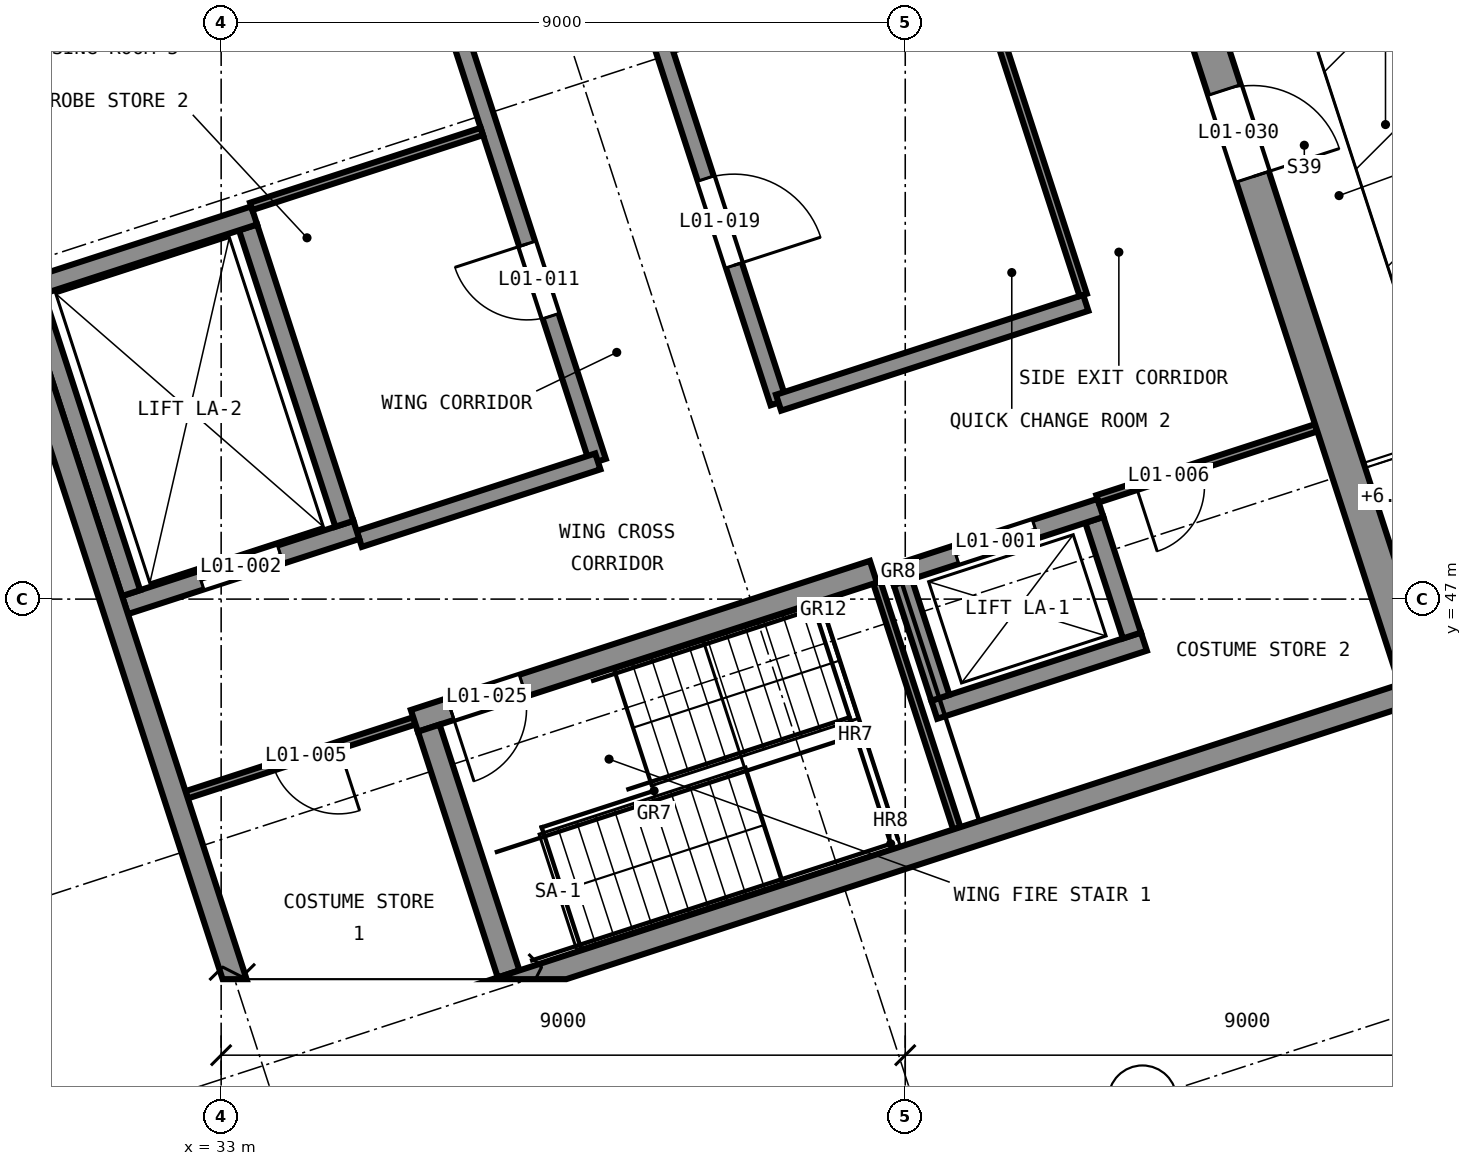
"""IFC4 building model, lengths in metres.
Left out: names, types, materials, properties, quantities, classifications, styles, units other than length and angle.
Written with IfcOpenShell. Run it as: python <this file> out.ifc"""

import sys

from ifc_helpers import new_model, si_unit, direction, frame, frame_2d, origin, place, context, subcontext, project, spatial, rectangle, extrude, element, fill, save


model = new_model("IFC4")
c1 = context("Model", 3, precision=1e-05, world=origin(), true_north=direction((0.0, 1.0)))
c2 = subcontext(c1, "Body", "Model", "MODEL_VIEW")
j1 = project(units=[si_unit("LENGTHUNIT", "METRE"), si_unit("PLANEANGLEUNIT", "RADIAN")], contexts=[c1])
p1 = place(None, origin())
s1 = spatial("IfcSite", under=j1, at=p1, CompositionType="ELEMENT")
p2 = place(p1, origin())
s2 = spatial("IfcBuilding", under=s1, at=p2, CompositionType="ELEMENT")
p3 = place(p2, frame((0.0, 0.0, 5.5)))
s3 = spatial("IfcBuildingStorey", under=s2, at=p3, CompositionType="ELEMENT", Elevation=5.5)
p4 = place(p3, frame((49.93, 42.214, 0.0), z_axis=(0.0, 0.0, 1.0), x_axis=(-0.309016215614, 0.95105676933, 0.0)))
e1 = element("IfcWall", 1, at=p4, inside=s3, PredefinedType="SHEAR", context=c2, shape_type="SweptSolid", body=[
    extrude(rectangle(XDim=27.975, YDim=0.45, at=frame_2d((13.988, 0.0))), origin(), (0.0, 0.0, 1.0), 4.0),
])
p5 = place(p4, frame((10.875, 0.0, 0.0)))
e2 = element("IfcOpeningElement", 2, at=p5, cuts=e1, PredefinedType="OPENING", context=c2, shape_type="SweptSolid", body=[
    extrude(rectangle(XDim=1.2, YDim=2.1, at=frame_2d((0.6, 1.05))), frame((0.0, 0.235, 0.0), z_axis=(0.0, -1.0, 0.0), x_axis=(1.0, 0.0, 0.0)), (0.0, 0.0, 1.0), 0.47),
])
p6 = place(p3, frame((48.55, 45.735, 0.0), z_axis=(0.0, 0.0, 1.0), x_axis=(-0.951061216338, -0.309002528757, 0.0)))
e3 = element("IfcWall", 3, at=p6, inside=s3, PredefinedType="SOLIDWALL", context=c2, shape_type="SweptSolid", body=[
    extrude(rectangle(XDim=15.925, YDim=0.3, at=frame_2d((7.962, 0.0))), origin(), (0.0, 0.0, 1.0), 4.0),
])
p7 = place(p3, frame((33.501, 41.003, 0.0), z_axis=(0.0, 0.0, 1.0), x_axis=(-0.309017194826, 0.951056451165, 0.0)))
e4 = element("IfcWall", 4, at=p7, inside=s3, PredefinedType="SOLIDWALL", context=c2, shape_type="SweptSolid", body=[
    extrude(rectangle(XDim=53.7, YDim=0.3, at=frame_2d((26.85, 0.0))), origin(), (0.0, 0.0, 1.0), 4.0),
])
p8 = place(p7, frame((26.55, 0.0, 0.9)))
e5 = element("IfcOpeningElement", 5, at=p8, cuts=e4, PredefinedType="OPENING", context=c2, shape_type="SweptSolid", body=[
    extrude(rectangle(XDim=3.6, YDim=2.1, at=frame_2d((1.8, 1.05))), frame((0.0, 0.16, 0.0), z_axis=(0.0, -1.0, 0.0), x_axis=(1.0, 0.0, 0.0)), (0.0, 0.0, 1.0), 0.32),
])
p9 = place(p3, frame((41.581, 47.361, 0.0), z_axis=(0.0, 0.0, 1.0), x_axis=(-0.951058929949, -0.309009565815, 0.0)))
e6 = element("IfcWall", 6, at=p9, inside=s3, PredefinedType="SOLIDWALL", context=c2, shape_type="SweptSolid", body=[
    extrude(rectangle(XDim=6.35, YDim=0.3, at=frame_2d((3.175, 0.0))), origin(), (0.0, 0.0, 1.0), 3.7),
])
p10 = place(p9, frame((4.85, 0.0, 0.0)))
e7 = element("IfcOpeningElement", 7, at=p10, cuts=e6, PredefinedType="OPENING", context=c2, shape_type="SweptSolid", body=[
    extrude(rectangle(XDim=1.0, YDim=2.1, at=frame_2d((0.5, 1.05))), frame((0.0, 0.16, 0.0), z_axis=(0.0, -1.0, 0.0), x_axis=(1.0, 0.0, 0.0)), (0.0, 0.0, 1.0), 0.32),
])
p11 = place(p3, frame((35.731, 45.302, 0.0), z_axis=(0.0, 0.0, 1.0), x_axis=(0.308980533303, -0.951068362443, 0.0)))
e8 = element("IfcWall", 8, at=p11, inside=s3, PredefinedType="SOLIDWALL", context=c2, shape_type="SweptSolid", body=[
    extrude(rectangle(XDim=3.4, YDim=0.3, at=frame_2d((1.7, 0.0))), origin(), (0.0, 0.0, 1.0), 3.7),
])
p12 = place(p3, frame((42.382, 45.544, 0.0), z_axis=(0.0, 0.0, 1.0), x_axis=(0.951071801089, 0.308969948659, 0.0)))
e9 = element("IfcWall", 9, at=p12, inside=s3, PredefinedType="SHEAR", context=c2, shape_type="SweptSolid", body=[
    extrude(rectangle(XDim=2.9, YDim=0.25, at=frame_2d((1.45, 0.0))), origin(), (0.0, 0.0, 1.0), 4.0),
])
p13 = place(p3, frame((44.982, 46.521, 0.0), z_axis=(0.0, 0.0, 1.0), x_axis=(-0.308986014439, 0.951066581729, 0.0)))
e10 = element("IfcWall", 10, at=p13, inside=s3, PredefinedType="SHEAR", context=c2, shape_type="SweptSolid", body=[
    extrude(rectangle(XDim=1.6, YDim=0.25, at=frame_2d((0.8, 0.0))), origin(), (0.0, 0.0, 1.0), 4.0),
])
p14 = place(p3, frame((44.568, 48.2, 0.0), z_axis=(0.0, 0.0, 1.0), x_axis=(-0.951047059821, -0.309046096893, 0.0)))
e11 = element("IfcWall", 11, at=p14, inside=s3, PredefinedType="SHEAR", context=c2, shape_type="SweptSolid", body=[
    extrude(rectangle(XDim=2.9, YDim=0.25, at=frame_2d((1.45, 0.0))), origin(), (0.0, 0.0, 1.0), 4.0),
])
p15 = place(p14, frame((0.9, 0.0, 0.0)))
e12 = element("IfcOpeningElement", 12, at=p15, cuts=e11, PredefinedType="OPENING", context=c2, shape_type="SweptSolid", body=[
    extrude(rectangle(XDim=1.1, YDim=2.1, at=frame_2d((0.55, 1.05))), frame((0.0, 0.135, 0.0), z_axis=(0.0, -1.0, 0.0), x_axis=(1.0, 0.0, 0.0)), (0.0, 0.0, 1.0), 0.27),
])
p16 = place(p3, frame((41.968, 47.224, 0.0), z_axis=(0.0, 0.0, 1.0), x_axis=(0.308986014439, -0.951066581729, 0.0)))
e13 = element("IfcWall", 13, at=p16, inside=s3, PredefinedType="SHEAR", context=c2, shape_type="SweptSolid", body=[
    extrude(rectangle(XDim=1.6, YDim=0.25, at=frame_2d((0.8, 0.0))), origin(), (0.0, 0.0, 1.0), 4.0),
])
p17 = place(p3, frame((31.735, 46.922, 0.0), z_axis=(0.0, 0.0, 1.0), x_axis=(0.95104415986, 0.309055020985, 0.0)))
e14 = element("IfcWall", 14, at=p17, inside=s3, PredefinedType="SHEAR", context=c2, shape_type="SweptSolid", body=[
    extrude(rectangle(XDim=3.2, YDim=0.25, at=frame_2d((1.6, 0.0))), origin(), (0.0, 0.0, 1.0), 4.0),
])
p18 = place(p17, frame((1.05, 0.0, 0.0)))
e15 = element("IfcOpeningElement", 15, at=p18, cuts=e14, PredefinedType="OPENING", context=c2, shape_type="SweptSolid", body=[
    extrude(rectangle(XDim=1.1, YDim=2.1, at=frame_2d((0.55, 1.05))), frame((0.0, 0.135, 0.0), z_axis=(0.0, -1.0, 0.0), x_axis=(1.0, 0.0, 0.0)), (0.0, 0.0, 1.0), 0.27),
])
p19 = place(p3, frame((34.621, 47.991, 0.0), z_axis=(0.0, 0.0, 1.0), x_axis=(-0.309055103076, 0.951044133184, 0.0)))
e16 = element("IfcWall", 16, at=p19, inside=s3, PredefinedType="SHEAR", context=c2, shape_type="SweptSolid", body=[
    extrude(rectangle(XDim=4.1, YDim=0.25, at=frame_2d((2.05, 0.0))), origin(), (0.0, 0.0, 1.0), 4.0),
])
p20 = place(p3, frame((33.434, 52.048, 0.0), z_axis=(0.0, 0.0, 1.0), x_axis=(-0.951066581729, -0.308986014439, 0.0)))
e17 = element("IfcWall", 17, at=p20, inside=s3, PredefinedType="SHEAR", context=c2, shape_type="SweptSolid", body=[
    extrude(rectangle(XDim=3.2, YDim=0.25, at=frame_2d((1.6, 0.0))), origin(), (0.0, 0.0, 1.0), 4.0),
])
p21 = place(p3, frame((30.548, 50.979, 0.0), z_axis=(0.0, 0.0, 1.0), x_axis=(0.309055103076, -0.951044133184, 0.0)))
e18 = element("IfcWall", 18, at=p21, inside=s3, PredefinedType="SHEAR", context=c2, shape_type="SweptSolid", body=[
    extrude(rectangle(XDim=4.1, YDim=0.25, at=frame_2d((2.05, 0.0))), origin(), (0.0, 0.0, 1.0), 4.0),
])
p22 = place(p3, frame((37.956, 48.812, 0.0), z_axis=(0.0, 0.0, 1.0), x_axis=(-0.30901736393, 0.951056396219, 0.0)))
e19 = element("IfcWall", 19, at=p22, inside=s3, PredefinedType="SOLIDWALL", context=c2, shape_type="SweptSolid", body=[
    extrude(rectangle(XDim=41.7, YDim=0.22, at=frame_2d((20.85, 0.0))), origin(), (0.0, 0.0, 1.0), 3.7),
])
p23 = place(p22, frame((2.009, 0.0, 0.0)))
e20 = element("IfcOpeningElement", 20, at=p23, cuts=e19, PredefinedType="OPENING", context=c2, shape_type="SweptSolid", body=[
    extrude(rectangle(XDim=1.0, YDim=2.1, at=frame_2d((0.5, 1.05))), frame((0.0, 0.12, 0.0), z_axis=(0.0, -1.0, 0.0), x_axis=(1.0, 0.0, 0.0)), (0.0, 0.0, 1.0), 0.24),
])
p24 = place(p22, frame((6.6, 0.0, 0.0)))
e21 = element("IfcOpeningElement", 21, at=p24, cuts=e19, PredefinedType="OPENING", context=c2, shape_type="SweptSolid", body=[
    extrude(rectangle(XDim=1.2, YDim=2.1, at=frame_2d((0.6, 1.05))), frame((0.0, 0.12, 0.0), z_axis=(0.0, -1.0, 0.0), x_axis=(1.0, 0.0, 0.0)), (0.0, 0.0, 1.0), 0.24),
])
p25 = place(p22, frame((11.7, 0.0, 0.0)))
e22 = element("IfcOpeningElement", 22, at=p25, cuts=e19, PredefinedType="OPENING", context=c2, shape_type="SweptSolid", body=[
    extrude(rectangle(XDim=1.2, YDim=2.1, at=frame_2d((0.6, 1.05))), frame((0.0, 0.12, 0.0), z_axis=(0.0, -1.0, 0.0), x_axis=(1.0, 0.0, 0.0)), (0.0, 0.0, 1.0), 0.24),
])
p26 = place(p22, frame((16.7, 0.0, 0.0)))
e23 = element("IfcOpeningElement", 23, at=p26, cuts=e19, PredefinedType="OPENING", context=c2, shape_type="SweptSolid", body=[
    extrude(rectangle(XDim=1.2, YDim=2.1, at=frame_2d((0.6, 1.05))), frame((0.0, 0.12, 0.0), z_axis=(0.0, -1.0, 0.0), x_axis=(1.0, 0.0, 0.0)), (0.0, 0.0, 1.0), 0.24),
])
p27 = place(p22, frame((21.7, 0.0, 0.0)))
e24 = element("IfcOpeningElement", 24, at=p27, cuts=e19, PredefinedType="OPENING", context=c2, shape_type="SweptSolid", body=[
    extrude(rectangle(XDim=1.2, YDim=2.1, at=frame_2d((0.6, 1.05))), frame((0.0, 0.12, 0.0), z_axis=(0.0, -1.0, 0.0), x_axis=(1.0, 0.0, 0.0)), (0.0, 0.0, 1.0), 0.24),
])
p28 = place(p22, frame((26.7, 0.0, 0.0)))
e25 = element("IfcOpeningElement", 25, at=p28, cuts=e19, PredefinedType="OPENING", context=c2, shape_type="SweptSolid", body=[
    extrude(rectangle(XDim=1.2, YDim=2.1, at=frame_2d((0.6, 1.05))), frame((0.0, 0.12, 0.0), z_axis=(0.0, -1.0, 0.0), x_axis=(1.0, 0.0, 0.0)), (0.0, 0.0, 1.0), 0.24),
])
p29 = place(p22, frame((31.739, 0.0, 0.0)))
e26 = element("IfcOpeningElement", 26, at=p29, cuts=e19, PredefinedType="OPENING", context=c2, shape_type="SweptSolid", body=[
    extrude(rectangle(XDim=1.2, YDim=2.1, at=frame_2d((0.6, 1.05))), frame((0.0, 0.12, 0.0), z_axis=(0.0, -1.0, 0.0), x_axis=(1.0, 0.0, 0.0)), (0.0, 0.0, 1.0), 0.24),
])
p30 = place(p3, frame((40.333, 49.584, 0.0), z_axis=(0.0, 0.0, 1.0), x_axis=(-0.309015643281, 0.951056955291, 0.0)))
e27 = element("IfcWall", 27, at=p30, inside=s3, PredefinedType="SOLIDWALL", context=c2, shape_type="SweptSolid", body=[
    extrude(rectangle(XDim=41.7, YDim=0.22, at=frame_2d((20.85, 0.0))), origin(), (0.0, 0.0, 1.0), 3.7),
])
p31 = place(p30, frame((1.9, 0.0, 0.0)))
e28 = element("IfcOpeningElement", 28, at=p31, cuts=e27, PredefinedType="OPENING", context=c2, shape_type="SweptSolid", body=[
    extrude(rectangle(XDim=1.2, YDim=2.1, at=frame_2d((0.6, 1.05))), frame((0.0, 0.12, 0.0), z_axis=(0.0, -1.0, 0.0), x_axis=(1.0, 0.0, 0.0)), (0.0, 0.0, 1.0), 0.24),
])
p32 = place(p30, frame((8.285, 0.0, 0.0)))
e29 = element("IfcOpeningElement", 29, at=p32, cuts=e27, PredefinedType="OPENING", context=c2, shape_type="SweptSolid", body=[
    extrude(rectangle(XDim=1.0, YDim=2.1, at=frame_2d((0.5, 1.05))), frame((0.0, 0.12, 0.0), z_axis=(0.0, -1.0, 0.0), x_axis=(1.0, 0.0, 0.0)), (0.0, 0.0, 1.0), 0.24),
])
p33 = place(p30, frame((16.375, 0.0, 0.0)))
e30 = element("IfcOpeningElement", 30, at=p33, cuts=e27, PredefinedType="OPENING", context=c2, shape_type="SweptSolid", body=[
    extrude(rectangle(XDim=1.2, YDim=2.1, at=frame_2d((0.6, 1.05))), frame((0.0, 0.12, 0.0), z_axis=(0.0, -1.0, 0.0), x_axis=(1.0, 0.0, 0.0)), (0.0, 0.0, 1.0), 0.24),
])
p34 = place(p30, frame((25.752, 0.0, 0.0)))
e31 = element("IfcOpeningElement", 31, at=p34, cuts=e27, PredefinedType="OPENING", context=c2, shape_type="SweptSolid", body=[
    extrude(rectangle(XDim=1.0, YDim=2.1, at=frame_2d((0.5, 1.05))), frame((0.0, 0.12, 0.0), z_axis=(0.0, -1.0, 0.0), x_axis=(1.0, 0.0, 0.0)), (0.0, 0.0, 1.0), 0.24),
])
p35 = place(p30, frame((32.761, 0.0, 0.0)))
e32 = element("IfcOpeningElement", 32, at=p35, cuts=e27, PredefinedType="OPENING", context=c2, shape_type="SweptSolid", body=[
    extrude(rectangle(XDim=1.0, YDim=2.1, at=frame_2d((0.5, 1.05))), frame((0.0, 0.12, 0.0), z_axis=(0.0, -1.0, 0.0), x_axis=(1.0, 0.0, 0.0)), (0.0, 0.0, 1.0), 0.24),
])
p36 = place(p3, frame((34.817, 47.792, 0.0), z_axis=(0.0, 0.0, 1.0), x_axis=(0.951053095941, 0.309027520945, 0.0)))
e33 = element("IfcWall", 33, at=p36, inside=s3, PredefinedType="SOLIDWALL", context=c2, shape_type="SweptSolid", body=[
    extrude(rectangle(XDim=3.3, YDim=0.22, at=frame_2d((1.65, 0.0))), origin(), (0.0, 0.0, 1.0), 3.7),
])
p37 = place(p3, frame((40.333, 49.584, 0.0), z_axis=(0.0, 0.0, 1.0), x_axis=(0.951062770994, 0.308997743729, 0.0)))
e34 = element("IfcWall", 34, at=p37, inside=s3, PredefinedType="SOLIDWALL", context=c2, shape_type="SweptSolid", body=[
    extrude(rectangle(XDim=4.25, YDim=0.22, at=frame_2d((2.125, 0.0))), origin(), (0.0, 0.0, 1.0), 3.7),
])
p38 = place(p3, frame((32.546, 44.425, 0.0), z_axis=(0.0, 0.0, 1.0), x_axis=(0.951058557014, 0.309010713619, 0.0)))
e35 = element("IfcWall", 35, at=p38, inside=s3, PredefinedType="PARTITIONING", context=c2, shape_type="SweptSolid", body=[
    extrude(rectangle(XDim=3.15, YDim=0.1, at=frame_2d((1.575, 0.0))), origin(), (0.0, 0.0, 1.0), 3.7),
])
p39 = place(p38, frame((1.2, 0.0, 0.0)))
e36 = element("IfcOpeningElement", 36, at=p39, cuts=e35, PredefinedType="OPENING", context=c2, shape_type="SweptSolid", body=[
    extrude(rectangle(XDim=0.9, YDim=2.1, at=frame_2d((0.45, 1.05))), frame((0.0, 0.06, 0.0), z_axis=(0.0, -1.0, 0.0), x_axis=(1.0, 0.0, 0.0)), (0.0, 0.0, 1.0), 0.12),
])
p40 = place(p3, frame((44.53, 48.319, 0.0), z_axis=(0.0, 0.0, 1.0), x_axis=(0.951053046121, 0.30902767427, 0.0)))
e37 = element("IfcWall", 37, at=p40, inside=s3, PredefinedType="PARTITIONING", context=c2, shape_type="SweptSolid", body=[
    extrude(rectangle(XDim=3.025, YDim=0.1, at=frame_2d((1.512, 0.0))), origin(), (0.0, 0.0, 1.0), 3.7),
])
p41 = place(p40, frame((0.533, 0.0, 0.0)))
e38 = element("IfcOpeningElement", 38, at=p41, cuts=e37, PredefinedType="OPENING", context=c2, shape_type="SweptSolid", body=[
    extrude(rectangle(XDim=0.9, YDim=2.1, at=frame_2d((0.45, 1.05))), frame((0.0, 0.06, 0.0), z_axis=(0.0, -1.0, 0.0), x_axis=(1.0, 0.0, 0.0)), (0.0, 0.0, 1.0), 0.12),
])
p42 = place(p3, frame((33.396, 52.167, 0.0), z_axis=(0.0, 0.0, 1.0), x_axis=(0.951044192343, 0.309054921027, 0.0)))
e39 = element("IfcWall", 39, at=p42, inside=s3, PredefinedType="PARTITIONING", context=c2, shape_type="SweptSolid", body=[
    extrude(rectangle(XDim=3.19, YDim=0.1, at=frame_2d((1.595, 0.0))), origin(), (0.0, 0.0, 1.0), 3.7),
])
p43 = place(p3, frame((42.678, 43.985, 0.0), z_axis=(0.0, 0.0, 1.0), x_axis=(-0.309045481752, 0.951047259714, 0.0)))
e40 = element("IfcWall", 40, at=p43, inside=s3, PredefinedType="PARTITIONING", context=c2, shape_type="SweptSolid", body=[
    extrude(rectangle(XDim=3.4, YDim=0.1, at=frame_2d((1.7, 0.0))), origin(), (0.0, 0.0, 1.0), 3.7),
])
p44 = place(p3, frame((44.341, 51.002, 0.0), z_axis=(0.0, 0.0, 1.0), x_axis=(-0.309016547708, 0.951056661426, 0.0)))
e41 = element("IfcWall", 41, at=p44, inside=s3, PredefinedType="PARTITIONING", context=c2, shape_type="SweptSolid", body=[
    extrude(rectangle(XDim=11.99, YDim=0.1, at=frame_2d((5.995, 0.0))), origin(), (0.0, 0.0, 1.0), 3.7),
])
p45 = place(p15, origin())
e42 = element("IfcDoor", 42, at=p45, inside=s3, OperationType="SLIDING_TO_LEFT", PredefinedType="DOOR", context=c2, shape_type="SweptSolid", body=[
    extrude(rectangle(XDim=1.1, YDim=2.1, at=frame_2d((0.55, 1.05))), frame((0.0, 0.025, 0.0), z_axis=(0.0, -1.0, 0.0), x_axis=(1.0, 0.0, 0.0)), (0.0, 0.0, 1.0), 0.05),
])
fill(e12, e42)
p46 = place(p18, origin())
e43 = element("IfcDoor", 43, at=p46, inside=s3, OperationType="SLIDING_TO_LEFT", PredefinedType="DOOR", context=c2, shape_type="SweptSolid", body=[
    extrude(rectangle(XDim=1.1, YDim=2.1, at=frame_2d((0.55, 1.05))), frame((0.0, 0.025, 0.0), z_axis=(0.0, -1.0, 0.0), x_axis=(1.0, 0.0, 0.0)), (0.0, 0.0, 1.0), 0.05),
])
fill(e15, e43)
p47 = place(p39, frame((0.9, 0.0, 0.0), z_axis=(0.0, 0.0, 1.0), x_axis=(-1.0, 0.0, 0.0)))
e44 = element("IfcDoor", 44, at=p47, inside=s3, OperationType="SINGLE_SWING_RIGHT", PredefinedType="DOOR", context=c2, shape_type="SweptSolid", body=[
    extrude(rectangle(XDim=0.9, YDim=2.1, at=frame_2d((0.45, 1.05))), frame((0.0, 0.025, 0.0), z_axis=(0.0, -1.0, 0.0), x_axis=(1.0, 0.0, 0.0)), (0.0, 0.0, 1.0), 0.05),
])
fill(e36, e44)
p48 = place(p41, frame((0.9, 0.0, 0.0), z_axis=(0.0, 0.0, 1.0), x_axis=(-1.0, 0.0, 0.0)))
e45 = element("IfcDoor", 45, at=p48, inside=s3, OperationType="SINGLE_SWING_LEFT", PredefinedType="DOOR", context=c2, shape_type="SweptSolid", body=[
    extrude(rectangle(XDim=0.9, YDim=2.1, at=frame_2d((0.45, 1.05))), frame((0.0, 0.025, 0.0), z_axis=(0.0, -1.0, 0.0), x_axis=(1.0, 0.0, 0.0)), (0.0, 0.0, 1.0), 0.05),
])
fill(e38, e45)
p49 = place(p23, origin())
e46 = element("IfcDoor", 46, at=p49, inside=s3, OperationType="SINGLE_SWING_LEFT", PredefinedType="DOOR", context=c2, shape_type="SweptSolid", body=[
    extrude(rectangle(XDim=1.0, YDim=2.1, at=frame_2d((0.5, 1.05))), frame((0.0, 0.025, 0.0), z_axis=(0.0, -1.0, 0.0), x_axis=(1.0, 0.0, 0.0)), (0.0, 0.0, 1.0), 0.05),
])
fill(e20, e46)
p50 = place(p31, frame((1.2, 0.0, 0.0), z_axis=(0.0, 0.0, 1.0), x_axis=(-1.0, 0.0, 0.0)))
e47 = element("IfcDoor", 47, at=p50, inside=s3, OperationType="SINGLE_SWING_LEFT", PredefinedType="DOOR", context=c2, shape_type="SweptSolid", body=[
    extrude(rectangle(XDim=1.2, YDim=2.1, at=frame_2d((0.6, 1.05))), frame((0.0, 0.025, 0.0), z_axis=(0.0, -1.0, 0.0), x_axis=(1.0, 0.0, 0.0)), (0.0, 0.0, 1.0), 0.05),
])
fill(e28, e47)
p51 = place(p10, origin())
e48 = element("IfcDoor", 48, at=p51, inside=s3, OperationType="SINGLE_SWING_LEFT", PredefinedType="DOOR", context=c2, shape_type="SweptSolid", body=[
    extrude(rectangle(XDim=1.0, YDim=2.1, at=frame_2d((0.5, 1.05))), frame((0.0, 0.025, 0.0), z_axis=(0.0, -1.0, 0.0), x_axis=(1.0, 0.0, 0.0)), (0.0, 0.0, 1.0), 0.05),
])
fill(e7, e48)
p52 = place(p5, frame((1.2, 0.0, 0.0), z_axis=(0.0, 0.0, 1.0), x_axis=(-1.0, 0.0, 0.0)))
e49 = element("IfcDoor", 49, at=p52, inside=s3, OperationType="SINGLE_SWING_LEFT", PredefinedType="DOOR", context=c2, shape_type="SweptSolid", body=[
    extrude(rectangle(XDim=1.2, YDim=2.1, at=frame_2d((0.6, 1.05))), frame((0.0, 0.025, 0.0), z_axis=(0.0, -1.0, 0.0), x_axis=(1.0, 0.0, 0.0)), (0.0, 0.0, 1.0), 0.05),
])
fill(e2, e49)
save(model, sys.argv[1])
